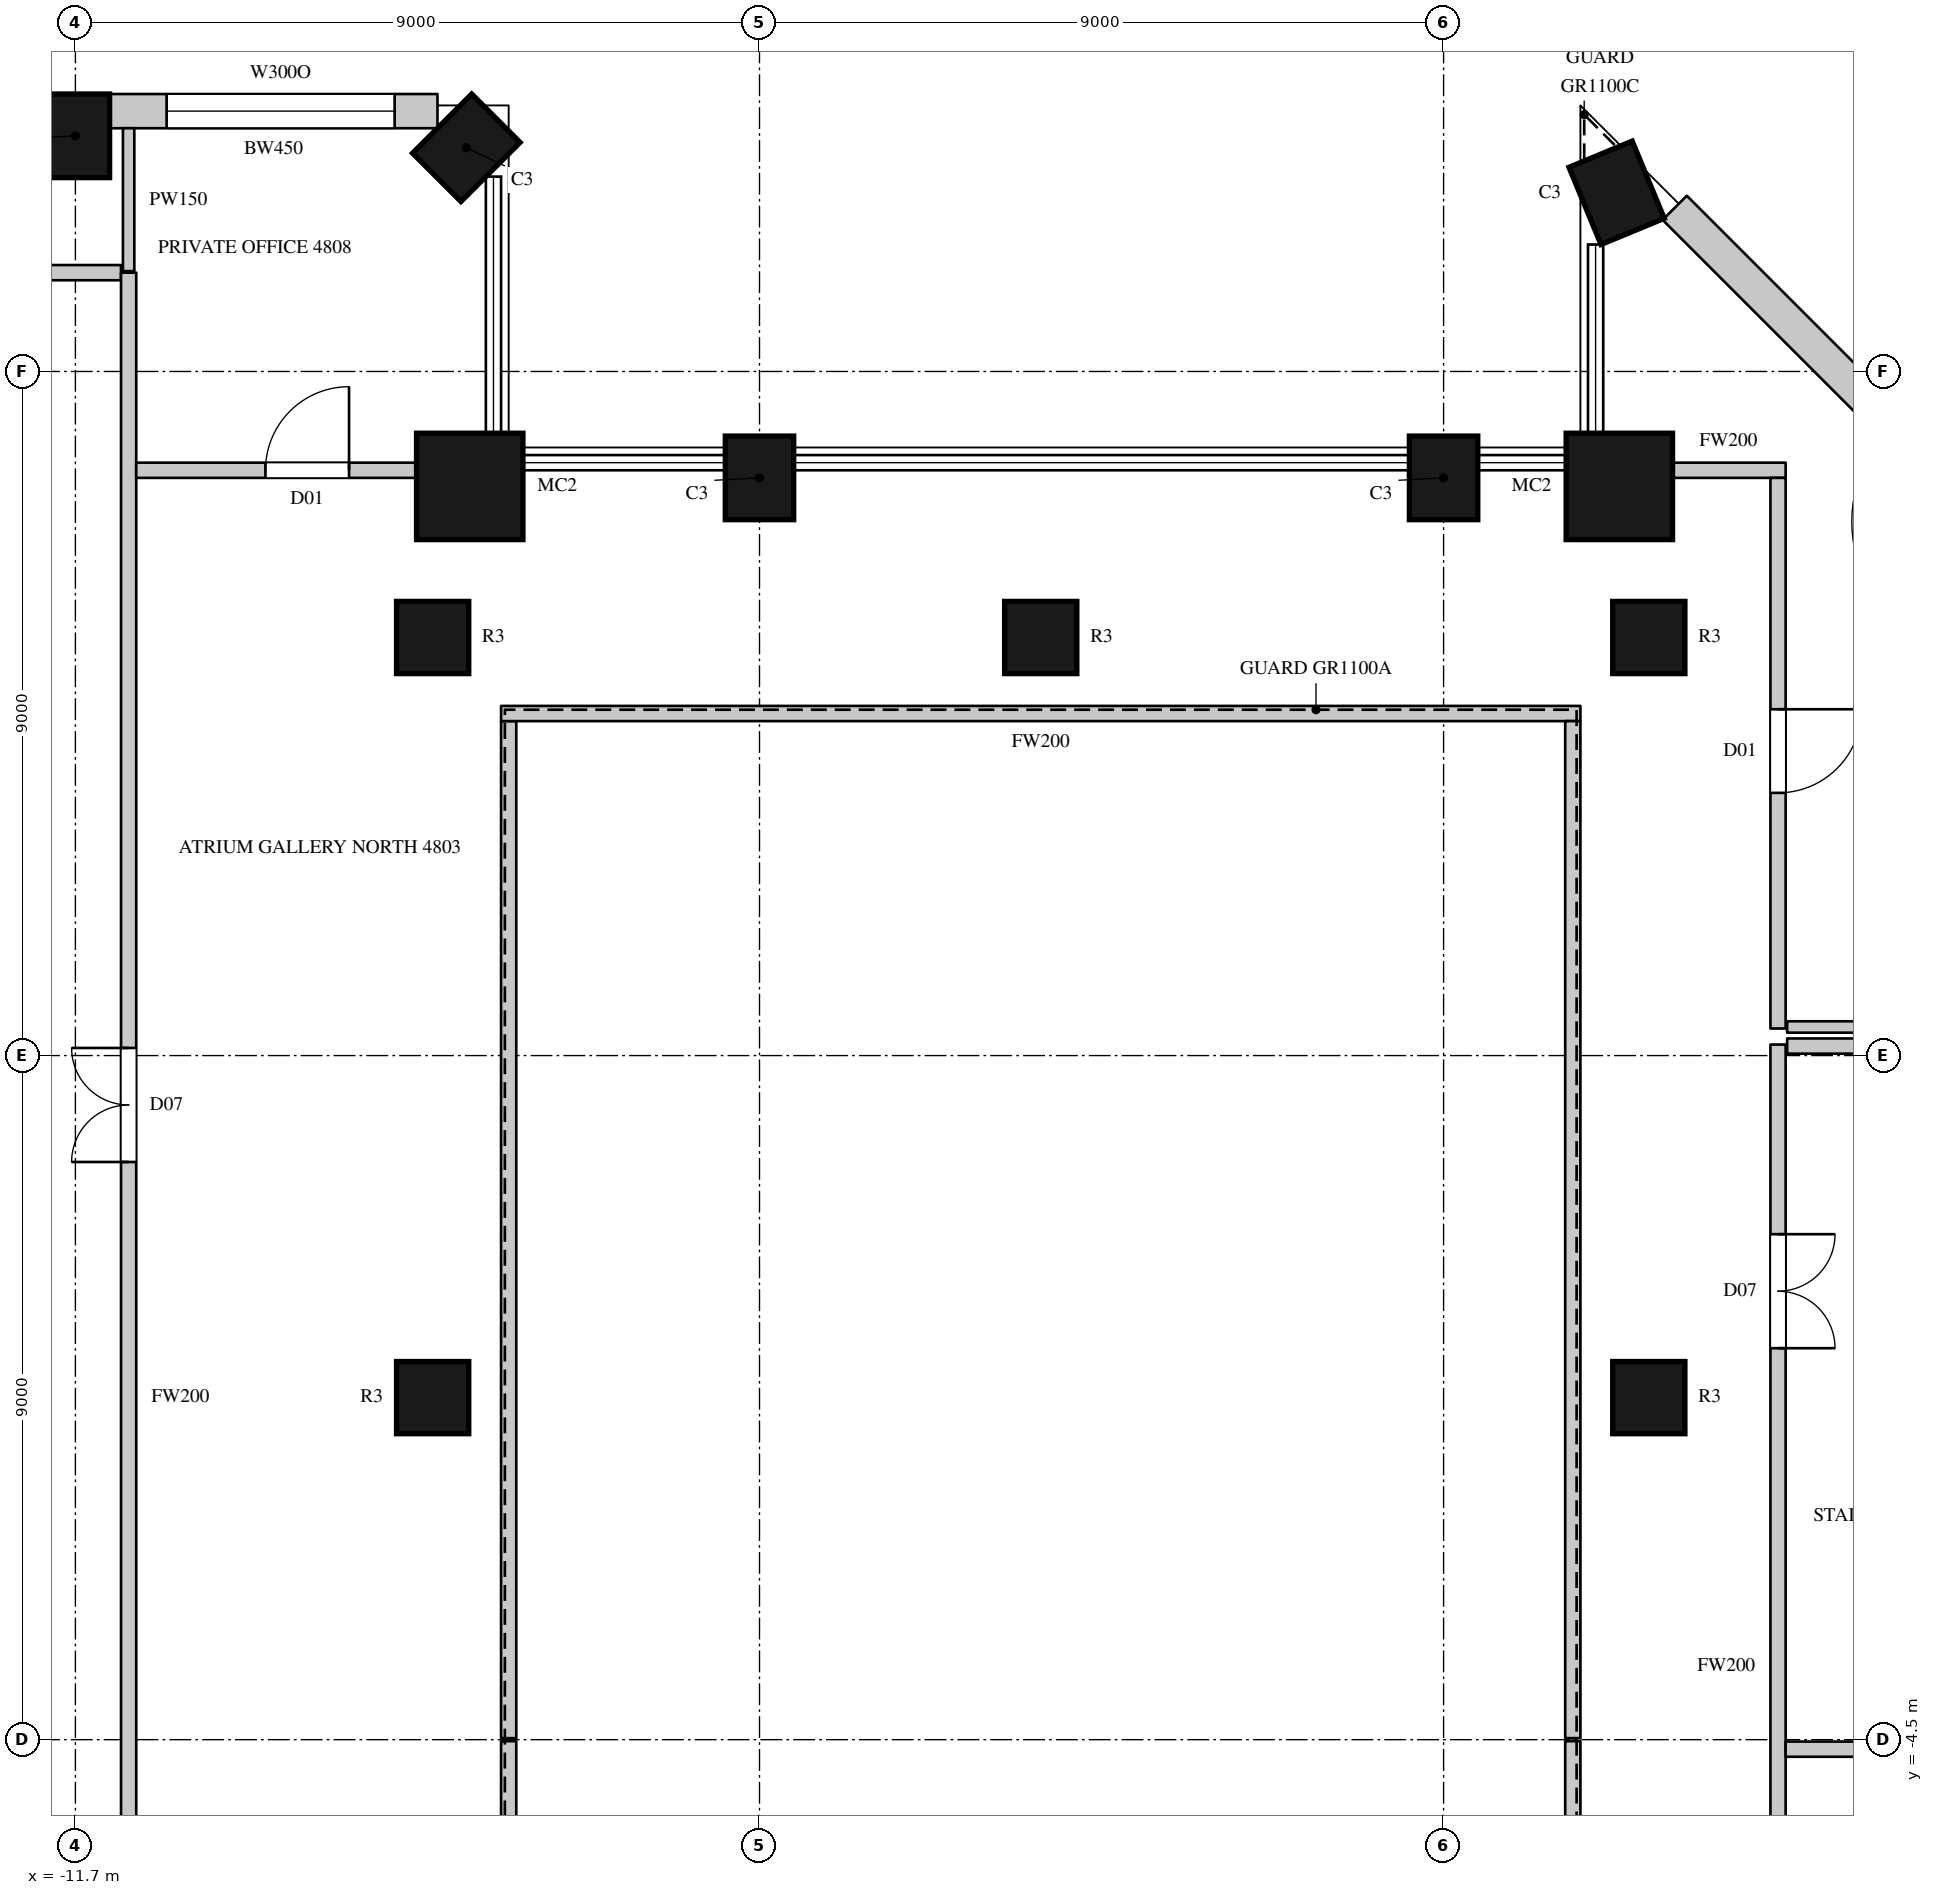
"""IFC4 building model, lengths in metres.
Left out: names, types, materials, properties, quantities, classifications, styles, units other than length and angle.
Written with IfcOpenShell. Run it as: python <this file> out.ifc"""

import sys

from ifc_helpers import new_model, si_unit, direction, frame, frame_2d, origin, origin_2d, place, context, subcontext, project, spatial, rectangle, circle, extrude, element, fill, save


model = new_model("IFC4")
c1 = context("Model", 3, precision=1e-05, world=origin(), true_north=direction((0.0, 1.0)))
c2 = subcontext(c1, "Body", "Model", "MODEL_VIEW")
j1 = project(units=[si_unit("LENGTHUNIT", "METRE"), si_unit("PLANEANGLEUNIT", "RADIAN")], contexts=[c1])
p1 = place(None, origin())
s1 = spatial("IfcSite", under=j1, at=p1, CompositionType="ELEMENT")
p2 = place(p1, origin())
s2 = spatial("IfcBuilding", under=s1, at=p2, CompositionType="ELEMENT")
p3 = place(p2, frame((0.0, 0.0, 217.9)))
s3 = spatial("IfcBuildingStorey", under=s2, at=p3, CompositionType="ELEMENT", Elevation=217.9)
p4 = place(p3, frame((8.576, 15.85, 0.0), z_axis=(0.0, 0.0, 1.0), x_axis=(-0.923879672772, -0.382683093746, 0.0)))
e1 = element("IfcColumn", 1, at=p4, inside=s3, PredefinedType="COLUMN", context=c2, shape_type="SweptSolid", body=[
    extrude(rectangle(XDim=0.9, YDim=1.1, at=origin_2d()), origin(), (0.0, 0.0, 1.0), 4.1),
])
p5 = place(p3, frame((8.612, 11.988, 0.0), z_axis=(0.0, 0.0, 1.0), x_axis=(1.0, 0.0, 0.0)))
e2 = element("IfcColumn", 2, at=p5, inside=s3, PredefinedType="COLUMN", context=c2, shape_type="SweptSolid", body=[
    extrude(circle(Radius=0.7, at=origin_2d()), origin(), (0.0, 0.0, 1.0), 4.1),
])
for number, where, z_axis, x_axis in (
    (3, (6.3, 12.1, 0.0), (0.0, 0.0, 1.0), (-1.0, 0.0, 0.0)),
    (4, (-2.7, 12.1, 0.0), (0.0, 0.0, 1.0), (-1.0, 0.0, 0.0)),
):
    element("IfcColumn", number, at=place(p3, frame(where, z_axis=z_axis, x_axis=x_axis)), inside=s3, PredefinedType="COLUMN", context=c2, shape_type="SweptSolid", body=[
        extrude(rectangle(XDim=0.9, YDim=1.1, at=origin_2d()), origin(), (0.0, 0.0, 1.0), 4.1),
    ])
p6 = place(p3, frame((-6.512, 11.988, 0.0), z_axis=(0.0, 0.0, 1.0), x_axis=(1.0, 0.0, 0.0)))
e5 = element("IfcColumn", 5, at=p6, inside=s3, PredefinedType="COLUMN", context=c2, shape_type="SweptSolid", body=[
    extrude(circle(Radius=0.7, at=origin_2d()), origin(), (0.0, 0.0, 1.0), 4.1),
])
for number, where, z_axis, x_axis in (
    (6, (-6.557, 16.443, 0.0), (0.0, 0.0, 1.0), (-0.707, 0.707, 0.0)),
    (7, (-11.7, 16.6, 0.0), (0.0, 0.0, 1.0), (-1.0, 0.0, 0.0)),
):
    element("IfcColumn", number, at=place(p3, frame(where, z_axis=z_axis, x_axis=x_axis)), inside=s3, PredefinedType="COLUMN", context=c2, shape_type="SweptSolid", body=[
        extrude(rectangle(XDim=0.9, YDim=1.1, at=origin_2d()), origin(), (0.0, 0.0, 1.0), 4.1),
    ])
for number, where, z_axis, x_axis in (
    (8, (-7.0, 0.0, 0.0), (0.0, 0.0, 1.0), (1.0, 0.0, 0.0)),
    (9, (-7.0, 10.0, 0.0), (0.0, 0.0, 1.0), (1.0, 0.0, 0.0)),
    (10, (1.0, 10.0, 0.0), (0.0, 0.0, 1.0), (1.0, 0.0, 0.0)),
    (11, (9.0, 0.0, 0.0), (0.0, 0.0, 1.0), (1.0, 0.0, 0.0)),
    (12, (9.0, 10.0, 0.0), (0.0, 0.0, 1.0), (1.0, 0.0, 0.0)),
):
    element("IfcColumn", number, at=place(p3, frame(where, z_axis=z_axis, x_axis=x_axis)), inside=s3, PredefinedType="COLUMN", context=c2, shape_type="SweptSolid", body=[
        extrude(circle(Radius=0.475, at=origin_2d()), origin(), (0.0, 0.0, 1.0), 4.1),
    ])
p7 = place(p3, frame((13.941, 11.053, 0.0), z_axis=(0.0, 0.0, 1.0), x_axis=(-0.707106781187, 0.707106781187, 0.0)))
e13 = element("IfcWall", 13, at=p7, inside=s3, PredefinedType="SOLIDWALL", context=c2, shape_type="SweptSolid", body=[
    extrude(rectangle(XDim=6.505, YDim=0.45, at=frame_2d((3.252, 0.0))), origin(), (0.0, 0.0, 1.0), 3.8),
])
p8 = place(p7, frame((0.665, 0.0, 0.0)))
e14 = element("IfcOpeningElement", 14, at=p8, cuts=e13, PredefinedType="OPENING", context=c2, shape_type="SweptSolid", body=[
    extrude(rectangle(XDim=1.8, YDim=2.4, at=frame_2d((0.9, 1.2))), frame((0.0, 0.235, 0.0), z_axis=(0.0, -1.0, 0.0), x_axis=(1.0, 0.0, 0.0)), (0.0, 0.0, 1.0), 0.47),
])
p9 = place(p3, frame((-6.936, 16.925, 0.0), z_axis=(0.0, 0.0, 1.0), x_axis=(-1.0, 0.0, 0.0)))
e15 = element("IfcWall", 15, at=p9, inside=s3, PredefinedType="SOLIDWALL", context=c2, shape_type="SweptSolid", body=[
    extrude(rectangle(XDim=4.314, YDim=0.45, at=frame_2d((2.157, 0.0))), origin(), (0.0, 0.0, 1.0), 3.8),
])
p10 = place(p9, frame((0.564, 0.0, 1.05)))
e16 = element("IfcOpeningElement", 16, at=p10, cuts=e15, PredefinedType="OPENING", context=c2, shape_type="SweptSolid", body=[
    extrude(rectangle(XDim=3.0, YDim=2.4, at=frame_2d((1.5, 1.2))), frame((0.0, 0.235, 0.0), z_axis=(0.0, -1.0, 0.0), x_axis=(1.0, 0.0, 0.0)), (0.0, 0.0, 1.0), 0.47),
])
p11 = place(p3, frame((-13.97, 14.8, 0.0), z_axis=(0.0, 0.0, 1.0), x_axis=(1.0, 0.0, 0.0)))
e17 = element("IfcWall", 17, at=p11, inside=s3, PredefinedType="PARTITIONING", context=c2, shape_type="SweptSolid", body=[
    extrude(rectangle(XDim=2.87, YDim=0.2, at=frame_2d((1.435, 0.0))), origin(), (0.0, 0.0, 1.0), 3.8),
])
p12 = place(p3, frame((-11.0, -14.8, 0.0), z_axis=(0.0, 0.0, 1.0), x_axis=(0.0, 1.0, 0.0)))
e18 = element("IfcWall", 18, at=p12, inside=s3, PredefinedType="PARTITIONING", context=c2, shape_type="SweptSolid", body=[
    extrude(rectangle(XDim=29.6, YDim=0.2, at=frame_2d((14.8, 0.0))), origin(), (0.0, 0.0, 1.0), 3.8),
])
p13 = place(p12, frame((17.9, 0.0, 0.0)))
e19 = element("IfcOpeningElement", 19, at=p13, cuts=e18, PredefinedType="OPENING", context=c2, shape_type="SweptSolid", body=[
    extrude(rectangle(XDim=1.5, YDim=2.4, at=frame_2d((0.75, 1.2))), frame((0.0, 0.11, 0.0), z_axis=(0.0, -1.0, 0.0), x_axis=(1.0, 0.0, 0.0)), (0.0, 0.0, 1.0), 0.22),
])
p14 = place(p3, frame((-10.9, 12.2, 0.0), z_axis=(0.0, 0.0, 1.0), x_axis=(1.0, 0.0, 0.0)))
e20 = element("IfcWall", 20, at=p14, inside=s3, PredefinedType="PARTITIONING", context=c2, shape_type="SweptSolid", body=[
    extrude(rectangle(XDim=3.704, YDim=0.2, at=frame_2d((1.852, 0.0))), origin(), (0.0, 0.0, 1.0), 3.8),
])
p15 = place(p14, frame((1.7, 0.0, 0.0)))
e21 = element("IfcOpeningElement", 21, at=p15, cuts=e20, PredefinedType="OPENING", context=c2, shape_type="SweptSolid", body=[
    extrude(rectangle(XDim=1.1, YDim=2.4, at=frame_2d((0.55, 1.2))), frame((0.0, 0.11, 0.0), z_axis=(0.0, -1.0, 0.0), x_axis=(1.0, 0.0, 0.0)), (0.0, 0.0, 1.0), 0.22),
])
p16 = place(p3, frame((-6.0, -8.9, 0.0), z_axis=(0.0, 0.0, 1.0), x_axis=(0.0, 1.0, 0.0)))
e22 = element("IfcWall", 22, at=p16, inside=s3, PredefinedType="PARTITIONING", context=c2, shape_type="SweptSolid", body=[
    extrude(rectangle(XDim=4.38, YDim=0.2, at=frame_2d((2.19, 0.0))), origin(), (0.0, 0.0, 1.0), 3.8),
])
p17 = place(p3, frame((-6.0, -4.48, 0.0), z_axis=(0.0, 0.0, 1.0), x_axis=(0.0, 1.0, 0.0)))
e23 = element("IfcWall", 23, at=p17, inside=s3, PredefinedType="PARTITIONING", context=c2, shape_type="SweptSolid", body=[
    extrude(rectangle(XDim=13.38, YDim=0.2, at=frame_2d((6.69, 0.0))), origin(), (0.0, 0.0, 1.0), 3.8),
])
p18 = place(p3, frame((-6.1, 9.0, 0.0), z_axis=(0.0, 0.0, 1.0), x_axis=(1.0, 0.0, 0.0)))
e24 = element("IfcWall", 24, at=p18, inside=s3, PredefinedType="PARTITIONING", context=c2, shape_type="SweptSolid", body=[
    extrude(rectangle(XDim=14.2, YDim=0.2, at=frame_2d((7.1, 0.0))), origin(), (0.0, 0.0, 1.0), 3.8),
])
p19 = place(p3, frame((8.0, -8.9, 0.0), z_axis=(0.0, 0.0, 1.0), x_axis=(0.0, 1.0, 0.0)))
e25 = element("IfcWall", 25, at=p19, inside=s3, PredefinedType="PARTITIONING", context=c2, shape_type="SweptSolid", body=[
    extrude(rectangle(XDim=4.38, YDim=0.2, at=frame_2d((2.19, 0.0))), origin(), (0.0, 0.0, 1.0), 3.8),
])
p20 = place(p3, frame((8.0, -4.48, 0.0), z_axis=(0.0, 0.0, 1.0), x_axis=(0.0, 1.0, 0.0)))
e26 = element("IfcWall", 26, at=p20, inside=s3, PredefinedType="PARTITIONING", context=c2, shape_type="SweptSolid", body=[
    extrude(rectangle(XDim=13.38, YDim=0.2, at=frame_2d((6.69, 0.0))), origin(), (0.0, 0.0, 1.0), 3.8),
])
p21 = place(p3, frame((9.296, 12.2, 0.0), z_axis=(0.0, 0.0, 1.0), x_axis=(1.0, 0.0, 0.0)))
e27 = element("IfcWall", 27, at=p21, inside=s3, PredefinedType="PARTITIONING", context=c2, shape_type="SweptSolid", body=[
    extrude(rectangle(XDim=1.504, YDim=0.2, at=frame_2d((0.752, 0.0))), origin(), (0.0, 0.0, 1.0), 3.8),
])
p22 = place(p3, frame((10.7, -11.7, 0.0), z_axis=(0.0, 0.0, 1.0), x_axis=(0.0, 1.0, 0.0)))
e28 = element("IfcWall", 28, at=p22, inside=s3, PredefinedType="PARTITIONING", context=c2, shape_type="SweptSolid", body=[
    extrude(rectangle(XDim=16.345, YDim=0.2, at=frame_2d((8.172, 0.0))), origin(), (0.0, 0.0, 1.0), 3.8),
])
p23 = place(p22, frame((12.35, 0.0, 0.0)))
e29 = element("IfcOpeningElement", 29, at=p23, cuts=e28, PredefinedType="OPENING", context=c2, shape_type="SweptSolid", body=[
    extrude(rectangle(XDim=1.5, YDim=2.4, at=frame_2d((0.75, 1.2))), frame((0.0, 0.11, 0.0), z_axis=(0.0, -1.0, 0.0), x_axis=(1.0, 0.0, 0.0)), (0.0, 0.0, 1.0), 0.22),
])
p24 = place(p22, frame((3.0, 0.0, 0.0)))
e30 = element("IfcOpeningElement", 30, at=p24, cuts=e28, PredefinedType="OPENING", context=c2, shape_type="SweptSolid", body=[
    extrude(rectangle(XDim=1.1, YDim=2.4, at=frame_2d((0.55, 1.2))), frame((0.0, 0.11, 0.0), z_axis=(0.0, -1.0, 0.0), x_axis=(1.0, 0.0, 0.0)), (0.0, 0.0, 1.0), 0.22),
])
p25 = place(p3, frame((10.8, -4.625, 0.0), z_axis=(0.0, 0.0, 1.0), x_axis=(1.0, 0.0, 0.0)))
e31 = element("IfcWall", 31, at=p25, inside=s3, PredefinedType="PARTITIONING", context=c2, shape_type="SweptSolid", body=[
    extrude(rectangle(XDim=3.875, YDim=0.2, at=frame_2d((1.938, 0.0))), origin(), (0.0, 0.0, 1.0), 3.8),
])
p26 = place(p3, frame((10.7, 4.856, 0.0), z_axis=(0.0, 0.0, 1.0), x_axis=(0.0, 1.0, 0.0)))
e32 = element("IfcWall", 32, at=p26, inside=s3, PredefinedType="PARTITIONING", context=c2, shape_type="SweptSolid", body=[
    extrude(rectangle(XDim=7.244, YDim=0.2, at=frame_2d((3.622, 0.0))), origin(), (0.0, 0.0, 1.0), 3.8),
])
p27 = place(p26, frame((3.1, 0.0, 0.0)))
e33 = element("IfcOpeningElement", 33, at=p27, cuts=e32, PredefinedType="OPENING", context=c2, shape_type="SweptSolid", body=[
    extrude(rectangle(XDim=1.1, YDim=2.4, at=frame_2d((0.55, 1.2))), frame((0.0, 0.11, 0.0), z_axis=(0.0, -1.0, 0.0), x_axis=(1.0, 0.0, 0.0)), (0.0, 0.0, 1.0), 0.22),
])
p28 = place(p3, frame((10.82, 4.625, 0.0), z_axis=(0.0, 0.0, 1.0), x_axis=(1.0, 0.0, 0.0)))
e34 = element("IfcWall", 34, at=p28, inside=s3, PredefinedType="PARTITIONING", context=c2, shape_type="SweptSolid", body=[
    extrude(rectangle(XDim=3.835, YDim=0.2, at=frame_2d((1.917, 0.0))), origin(), (0.0, 0.0, 1.0), 3.8),
])
p29 = place(p3, frame((-11.0, 14.82, 0.0), z_axis=(0.0, 0.0, 1.0), x_axis=(0.0, 1.0, 0.0)))
e35 = element("IfcWall", 35, at=p29, inside=s3, PredefinedType="PARTITIONING", context=c2, shape_type="SweptSolid", body=[
    extrude(rectangle(XDim=1.88, YDim=0.15, at=frame_2d((0.94, 0.0))), origin(), (0.0, 0.0, 1.0), 3.8),
])
p30 = place(p3, frame((10.82, 4.876, 0.0), z_axis=(0.0, 0.0, 1.0), x_axis=(1.0, 0.0, 0.0)))
e36 = element("IfcWall", 36, at=p30, inside=s3, PredefinedType="PARTITIONING", context=c2, shape_type="SweptSolid", body=[
    extrude(rectangle(XDim=8.095, YDim=0.15, at=frame_2d((4.047, 0.0))), origin(), (0.0, 0.0, 1.0), 3.8),
])
p31 = place(p10, origin())
e37 = element("IfcWindow", 37, at=p31, inside=s3, PartitioningType="SINGLE_PANEL", PredefinedType="WINDOW", context=c2, shape_type="SweptSolid", body=[
    extrude(rectangle(XDim=3.0, YDim=2.4, at=frame_2d((1.5, 1.2))), frame((0.0, 0.135, 0.0), z_axis=(0.0, -1.0, 0.0), x_axis=(1.0, 0.0, 0.0)), (0.0, 0.0, 1.0), 0.06),
])
fill(e16, e37)
p32 = place(p13, origin())
e38 = element("IfcDoor", 38, at=p32, inside=s3, OperationType="DOUBLE_DOOR_SINGLE_SWING", PredefinedType="DOOR", context=c2, shape_type="SweptSolid", body=[
    extrude(rectangle(XDim=1.5, YDim=2.4, at=frame_2d((0.75, 1.2))), frame((0.0, 0.025, 0.0), z_axis=(0.0, -1.0, 0.0), x_axis=(1.0, 0.0, 0.0)), (0.0, 0.0, 1.0), 0.05),
])
fill(e19, e38)
p33 = place(p23, origin())
e39 = element("IfcDoor", 39, at=p33, inside=s3, OperationType="DOUBLE_DOOR_SINGLE_SWING", PredefinedType="DOOR", context=c2, shape_type="SweptSolid", body=[
    extrude(rectangle(XDim=1.5, YDim=2.4, at=frame_2d((0.75, 1.2))), frame((0.0, 0.025, 0.0), z_axis=(0.0, -1.0, 0.0), x_axis=(1.0, 0.0, 0.0)), (0.0, 0.0, 1.0), 0.05),
])
fill(e29, e39)
p34 = place(p15, origin())
e40 = element("IfcDoor", 40, at=p34, inside=s3, OperationType="SINGLE_SWING_RIGHT", PredefinedType="DOOR", context=c2, shape_type="SweptSolid", body=[
    extrude(rectangle(XDim=1.1, YDim=2.4, at=frame_2d((0.55, 1.2))), frame((0.0, 0.025, 0.0), z_axis=(0.0, -1.0, 0.0), x_axis=(1.0, 0.0, 0.0)), (0.0, 0.0, 1.0), 0.05),
])
fill(e21, e40)
p35 = place(p27, origin())
e41 = element("IfcDoor", 41, at=p35, inside=s3, OperationType="SINGLE_SWING_LEFT", PredefinedType="DOOR", context=c2, shape_type="SweptSolid", body=[
    extrude(rectangle(XDim=1.1, YDim=2.4, at=frame_2d((0.55, 1.2))), frame((0.0, 0.025, 0.0), z_axis=(0.0, -1.0, 0.0), x_axis=(1.0, 0.0, 0.0)), (0.0, 0.0, 1.0), 0.05),
])
fill(e33, e41)
save(model, sys.argv[1])
